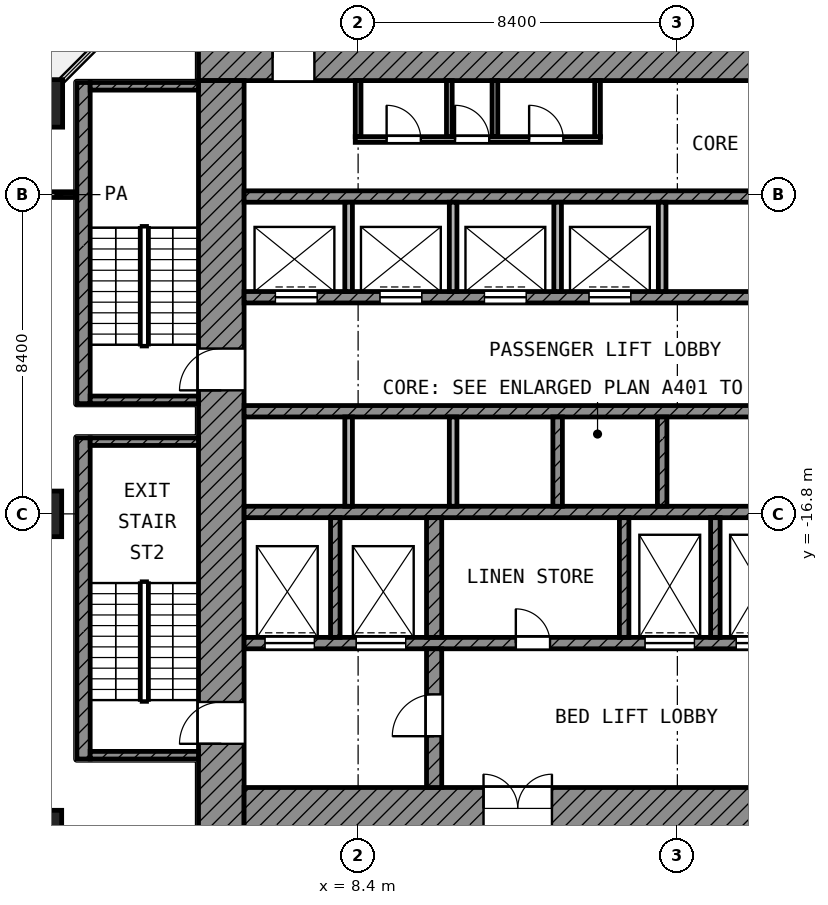
"""IFC4 building model, lengths in metres.
Left out: names, types, materials, properties, quantities, classifications, styles, units other than length and angle.
Written with IfcOpenShell. Run it as: python <this file> out.ifc"""

import sys

from ifc_helpers import new_model, si_unit, direction, frame, frame_2d, origin, origin_2d, place, context, subcontext, project, spatial, rectangle, extrude, element, fill, save


model = new_model("IFC4")
c1 = context("Model", 3, precision=1e-05, world=origin(), true_north=direction((0.0, 1.0)))
c2 = subcontext(c1, "Body", "Model", "MODEL_VIEW")
j1 = project(units=[si_unit("LENGTHUNIT", "METRE"), si_unit("PLANEANGLEUNIT", "RADIAN")], contexts=[c1])
p1 = place(None, origin())
s1 = spatial("IfcSite", under=j1, at=p1, CompositionType="ELEMENT")
p2 = place(p1, origin())
s2 = spatial("IfcBuilding", under=s1, at=p2, CompositionType="ELEMENT")
p3 = place(p2, frame((0.0, 0.0, 77.0)))
s3 = spatial("IfcBuildingStorey", under=s2, at=p3, CompositionType="ELEMENT", Elevation=77.0)
p4 = place(p3, frame((0.0, -6.0, 0.0), z_axis=(0.0, 0.0, 1.0), x_axis=(1.0, 0.0, 0.0)))
e1 = element("IfcColumn", 1, at=p4, inside=s3, PredefinedType="COLUMN", context=c2, shape_type="SweptSolid", body=[
    extrude(rectangle(XDim=1.25, YDim=1.25, at=origin_2d()), origin(), (0.0, 0.0, 1.0), 4.2),
])
for number, where, z_axis, x_axis in (
    (2, (0.0, -16.8, 0.0), (0.0, 0.0, 1.0), (1.0, 0.0, 0.0)),
    (3, (0.0, -25.2, 0.0), (0.0, 0.0, 1.0), (1.0, 0.0, 0.0)),
):
    element("IfcColumn", number, at=place(p3, frame(where, z_axis=z_axis, x_axis=x_axis)), inside=s3, PredefinedType="COLUMN", context=c2, shape_type="SweptSolid", body=[
        extrude(rectangle(XDim=1.2, YDim=1.2, at=origin_2d()), origin(), (0.0, 0.0, 1.0), 4.2),
    ])
p5 = place(p3, frame((4.2, -4.8, 0.0), z_axis=(0.0, 0.0, 1.0), x_axis=(1.0, 0.0, 0.0)))
e4 = element("IfcWall", 4, at=p5, inside=s3, PredefinedType="SHEAR", context=c2, shape_type="SweptSolid", body=[
    extrude(rectangle(XDim=20.9, YDim=1.2, at=frame_2d((10.45, 0.0))), origin(), (0.0, 0.0, 1.0), 3.9),
])
p6 = place(p5, frame((1.95, 0.0, 0.0)))
e5 = element("IfcOpeningElement", 5, at=p6, cuts=e4, PredefinedType="OPENING", context=c2, shape_type="SweptSolid", body=[
    extrude(rectangle(XDim=1.1, YDim=2.1, at=frame_2d((0.55, 1.05))), frame((0.0, 0.61, 0.0), z_axis=(0.0, -1.0, 0.0), x_axis=(1.0, 0.0, 0.0)), (0.0, 0.0, 1.0), 1.22),
])
p7 = place(p5, frame((17.95, 0.0, 0.0)))
e6 = element("IfcOpeningElement", 6, at=p7, cuts=e4, PredefinedType="OPENING", context=c2, shape_type="SweptSolid", body=[
    extrude(rectangle(XDim=1.1, YDim=2.1, at=frame_2d((0.55, 1.05))), frame((0.0, 0.61, 0.0), z_axis=(0.0, -1.0, 0.0), x_axis=(1.0, 0.0, 0.0)), (0.0, 0.0, 1.0), 1.22),
])
p8 = place(p3, frame((4.8, -25.1, 0.0), z_axis=(0.0, 0.0, 1.0), x_axis=(0.0, 1.0, 0.0)))
e7 = element("IfcWall", 7, at=p8, inside=s3, PredefinedType="SHEAR", context=c2, shape_type="SweptSolid", body=[
    extrude(rectangle(XDim=19.7, YDim=1.2, at=frame_2d((9.85, 0.0))), origin(), (0.0, 0.0, 1.0), 3.9),
])
p9 = place(p8, frame((11.55, 0.0, 0.0)))
e8 = element("IfcOpeningElement", 8, at=p9, cuts=e7, PredefinedType="OPENING", context=c2, shape_type="SweptSolid", body=[
    extrude(rectangle(XDim=1.1, YDim=2.1, at=frame_2d((0.55, 1.05))), frame((0.0, 0.61, 0.0), z_axis=(0.0, -1.0, 0.0), x_axis=(1.0, 0.0, 0.0)), (0.0, 0.0, 1.0), 1.22),
])
p10 = place(p8, frame((2.25, 0.0, 0.0)))
e9 = element("IfcOpeningElement", 9, at=p10, cuts=e7, PredefinedType="OPENING", context=c2, shape_type="SweptSolid", body=[
    extrude(rectangle(XDim=1.1, YDim=2.1, at=frame_2d((0.55, 1.05))), frame((0.0, 0.61, 0.0), z_axis=(0.0, -1.0, 0.0), x_axis=(1.0, 0.0, 0.0)), (0.0, 0.0, 1.0), 1.22),
])
p11 = place(p3, frame((5.4, -24.55, 0.0), z_axis=(0.0, 0.0, 1.0), x_axis=(1.0, 0.0, 0.0)))
e10 = element("IfcWall", 10, at=p11, inside=s3, PredefinedType="SHEAR", context=c2, shape_type="SweptSolid", body=[
    extrude(rectangle(XDim=18.6, YDim=1.1, at=frame_2d((9.3, 0.0))), origin(), (0.0, 0.0, 1.0), 3.9),
])
p12 = place(p11, frame((6.3, 0.0, 0.0)))
e11 = element("IfcOpeningElement", 11, at=p12, cuts=e10, PredefinedType="OPENING", context=c2, shape_type="SweptSolid", body=[
    extrude(rectangle(XDim=1.8, YDim=2.1, at=frame_2d((0.9, 1.05))), frame((0.0, 0.56, 0.0), z_axis=(0.0, -1.0, 0.0), x_axis=(1.0, 0.0, 0.0)), (0.0, 0.0, 1.0), 1.12),
])
p13 = place(p3, frame((5.4, -8.45, 0.0), z_axis=(0.0, 0.0, 1.0), x_axis=(1.0, 0.0, 0.0)))
e12 = element("IfcWall", 12, at=p13, inside=s3, PredefinedType="SHEAR", context=c2, shape_type="SweptSolid", body=[
    extrude(rectangle(XDim=16.65, YDim=0.3, at=frame_2d((8.325, 0.0))), origin(), (0.0, 0.0, 1.0), 3.9),
])
p14 = place(p3, frame((5.4, -11.1, 0.0), z_axis=(0.0, 0.0, 1.0), x_axis=(1.0, 0.0, 0.0)))
e13 = element("IfcWall", 13, at=p14, inside=s3, PredefinedType="SHEAR", context=c2, shape_type="SweptSolid", body=[
    extrude(rectangle(XDim=16.65, YDim=0.3, at=frame_2d((8.325, 0.0))), origin(), (0.0, 0.0, 1.0), 3.9),
])
p15 = place(p14, frame((0.825, 0.0, 0.0)))
e14 = element("IfcOpeningElement", 14, at=p15, cuts=e13, PredefinedType="OPENING", context=c2, shape_type="SweptSolid", body=[
    extrude(rectangle(XDim=1.1, YDim=2.1, at=frame_2d((0.55, 1.05))), frame((0.0, 0.16, 0.0), z_axis=(0.0, -1.0, 0.0), x_axis=(1.0, 0.0, 0.0)), (0.0, 0.0, 1.0), 0.32),
])
p16 = place(p14, frame((3.575, 0.0, 0.0)))
e15 = element("IfcOpeningElement", 15, at=p16, cuts=e13, PredefinedType="OPENING", context=c2, shape_type="SweptSolid", body=[
    extrude(rectangle(XDim=1.1, YDim=2.1, at=frame_2d((0.55, 1.05))), frame((0.0, 0.16, 0.0), z_axis=(0.0, -1.0, 0.0), x_axis=(1.0, 0.0, 0.0)), (0.0, 0.0, 1.0), 0.32),
])
p17 = place(p14, frame((6.325, 0.0, 0.0)))
e16 = element("IfcOpeningElement", 16, at=p17, cuts=e13, PredefinedType="OPENING", context=c2, shape_type="SweptSolid", body=[
    extrude(rectangle(XDim=1.1, YDim=2.1, at=frame_2d((0.55, 1.05))), frame((0.0, 0.16, 0.0), z_axis=(0.0, -1.0, 0.0), x_axis=(1.0, 0.0, 0.0)), (0.0, 0.0, 1.0), 0.32),
])
p18 = place(p14, frame((9.075, 0.0, 0.0)))
e17 = element("IfcOpeningElement", 17, at=p18, cuts=e13, PredefinedType="OPENING", context=c2, shape_type="SweptSolid", body=[
    extrude(rectangle(XDim=1.1, YDim=2.1, at=frame_2d((0.55, 1.05))), frame((0.0, 0.16, 0.0), z_axis=(0.0, -1.0, 0.0), x_axis=(1.0, 0.0, 0.0)), (0.0, 0.0, 1.0), 0.32),
])
for number, where, z_axis, x_axis in (
    (18, (5.4, -14.1, 0.0), (0.0, 0.0, 1.0), (1.0, 0.0, 0.0)),
    (19, (5.4, -16.75, 0.0), (0.0, 0.0, 1.0), (1.0, 0.0, 0.0)),
):
    element("IfcWall", number, at=place(p3, frame(where, z_axis=z_axis, x_axis=x_axis)), inside=s3, PredefinedType="SHEAR", context=c2, shape_type="SweptSolid", body=[
        extrude(rectangle(XDim=16.65, YDim=0.3, at=frame_2d((8.325, 0.0))), origin(), (0.0, 0.0, 1.0), 3.9),
    ])
p19 = place(p3, frame((5.4, -20.2, 0.0), z_axis=(0.0, 0.0, 1.0), x_axis=(1.0, 0.0, 0.0)))
e20 = element("IfcWall", 20, at=p19, inside=s3, PredefinedType="SHEAR", context=c2, shape_type="SweptSolid", body=[
    extrude(rectangle(XDim=14.65, YDim=0.3, at=frame_2d((7.325, 0.0))), origin(), (0.0, 0.0, 1.0), 3.9),
])
p20 = place(p19, frame((10.55, 0.0, 0.0)))
e21 = element("IfcOpeningElement", 21, at=p20, cuts=e20, PredefinedType="OPENING", context=c2, shape_type="SweptSolid", body=[
    extrude(rectangle(XDim=1.3, YDim=2.1, at=frame_2d((0.65, 1.05))), frame((0.0, 0.16, 0.0), z_axis=(0.0, -1.0, 0.0), x_axis=(1.0, 0.0, 0.0)), (0.0, 0.0, 1.0), 0.32),
])
p21 = place(p19, frame((12.95, 0.0, 0.0)))
e22 = element("IfcOpeningElement", 22, at=p21, cuts=e20, PredefinedType="OPENING", context=c2, shape_type="SweptSolid", body=[
    extrude(rectangle(XDim=1.3, YDim=2.1, at=frame_2d((0.65, 1.05))), frame((0.0, 0.16, 0.0), z_axis=(0.0, -1.0, 0.0), x_axis=(1.0, 0.0, 0.0)), (0.0, 0.0, 1.0), 0.32),
])
p22 = place(p19, frame((0.55, 0.0, 0.0)))
e23 = element("IfcOpeningElement", 23, at=p22, cuts=e20, PredefinedType="OPENING", context=c2, shape_type="SweptSolid", body=[
    extrude(rectangle(XDim=1.3, YDim=2.1, at=frame_2d((0.65, 1.05))), frame((0.0, 0.16, 0.0), z_axis=(0.0, -1.0, 0.0), x_axis=(1.0, 0.0, 0.0)), (0.0, 0.0, 1.0), 0.32),
])
p23 = place(p19, frame((2.95, 0.0, 0.0)))
e24 = element("IfcOpeningElement", 24, at=p23, cuts=e20, PredefinedType="OPENING", context=c2, shape_type="SweptSolid", body=[
    extrude(rectangle(XDim=1.3, YDim=2.1, at=frame_2d((0.65, 1.05))), frame((0.0, 0.16, 0.0), z_axis=(0.0, -1.0, 0.0), x_axis=(1.0, 0.0, 0.0)), (0.0, 0.0, 1.0), 0.32),
])
p24 = place(p19, frame((7.15, 0.0, 0.0)))
e25 = element("IfcOpeningElement", 25, at=p24, cuts=e20, PredefinedType="OPENING", context=c2, shape_type="SweptSolid", body=[
    extrude(rectangle(XDim=0.9, YDim=2.1, at=frame_2d((0.45, 1.05))), frame((0.0, 0.16, 0.0), z_axis=(0.0, -1.0, 0.0), x_axis=(1.0, 0.0, 0.0)), (0.0, 0.0, 1.0), 0.32),
])
p25 = place(p3, frame((10.4, -24.0, 0.0), z_axis=(0.0, 0.0, 1.0), x_axis=(0.0, 1.0, 0.0)))
e26 = element("IfcWall", 26, at=p25, inside=s3, PredefinedType="SHEAR", context=c2, shape_type="SweptSolid", body=[
    extrude(rectangle(XDim=3.65, YDim=0.4, at=frame_2d((1.825, 0.0))), origin(), (0.0, 0.0, 1.0), 3.9),
])
p26 = place(p25, frame((1.35, 0.0, 0.0)))
e27 = element("IfcOpeningElement", 27, at=p26, cuts=e26, PredefinedType="OPENING", context=c2, shape_type="SweptSolid", body=[
    extrude(rectangle(XDim=1.1, YDim=2.1, at=frame_2d((0.55, 1.05))), frame((0.0, 0.21, 0.0), z_axis=(0.0, -1.0, 0.0), x_axis=(1.0, 0.0, 0.0)), (0.0, 0.0, 1.0), 0.42),
])
p27 = place(p3, frame((10.4, -20.05, 0.0), z_axis=(0.0, 0.0, 1.0), x_axis=(0.0, 1.0, 0.0)))
e28 = element("IfcWall", 28, at=p27, inside=s3, PredefinedType="SHEAR", context=c2, shape_type="SweptSolid", body=[
    extrude(rectangle(XDim=3.15, YDim=0.4, at=frame_2d((1.575, 0.0))), origin(), (0.0, 0.0, 1.0), 3.9),
])
for number, where, z_axis, x_axis in (
    (29, (7.8, -20.05, 0.0), (0.0, 0.0, 1.0), (0.0, 1.0, 0.0)),
    (30, (15.4, -20.05, 0.0), (0.0, 0.0, 1.0), (0.0, 1.0, 0.0)),
    (31, (17.8, -20.05, 0.0), (0.0, 0.0, 1.0), (0.0, 1.0, 0.0)),
):
    element("IfcWall", number, at=place(p3, frame(where, z_axis=z_axis, x_axis=x_axis)), inside=s3, PredefinedType="SHEAR", context=c2, shape_type="SweptSolid", body=[
        extrude(rectangle(XDim=3.15, YDim=0.25, at=frame_2d((1.575, 0.0))), origin(), (0.0, 0.0, 1.0), 3.9),
    ])
for number, where, z_axis, x_axis in (
    (32, (8.15, -10.95, 0.0), (0.0, 0.0, 1.0), (0.0, 1.0, 0.0)),
    (33, (10.9, -10.95, 0.0), (0.0, 0.0, 1.0), (0.0, 1.0, 0.0)),
    (34, (13.65, -10.95, 0.0), (0.0, 0.0, 1.0), (0.0, 1.0, 0.0)),
    (35, (16.4, -10.95, 0.0), (0.0, 0.0, 1.0), (0.0, 1.0, 0.0)),
):
    element("IfcWall", number, at=place(p3, frame(where, z_axis=z_axis, x_axis=x_axis)), inside=s3, PredefinedType="PARTITIONING", context=c2, shape_type="SweptSolid", body=[
        extrude(rectangle(XDim=2.35, YDim=0.2, at=frame_2d((1.175, 0.0))), origin(), (0.0, 0.0, 1.0), 3.9),
    ])
for number, where, z_axis, x_axis in (
    (36, (8.15, -16.6, 0.0), (0.0, 0.0, 1.0), (0.0, 1.0, 0.0)),
    (37, (10.9, -16.6, 0.0), (0.0, 0.0, 1.0), (0.0, 1.0, 0.0)),
):
    element("IfcWall", number, at=place(p3, frame(where, z_axis=z_axis, x_axis=x_axis)), inside=s3, PredefinedType="PARTITIONING", context=c2, shape_type="SweptSolid", body=[
        extrude(rectangle(XDim=2.35, YDim=0.2, at=frame_2d((1.175, 0.0))), origin(), (0.0, 0.0, 1.0), 3.9),
    ])
for number, where, z_axis, x_axis in (
    (38, (13.65, -16.6, 0.0), (0.0, 0.0, 1.0), (0.0, 1.0, 0.0)),
    (39, (16.4, -16.6, 0.0), (0.0, 0.0, 1.0), (0.0, 1.0, 0.0)),
):
    element("IfcWall", number, at=place(p3, frame(where, z_axis=z_axis, x_axis=x_axis)), inside=s3, PredefinedType="SHEAR", context=c2, shape_type="SweptSolid", body=[
        extrude(rectangle(XDim=2.35, YDim=0.25, at=frame_2d((1.175, 0.0))), origin(), (0.0, 0.0, 1.0), 3.9),
    ])
p28 = place(p3, frame((8.325, -6.95, 0.0), z_axis=(0.0, 0.0, 1.0), x_axis=(1.0, 0.0, 0.0)))
e40 = element("IfcWall", 40, at=p28, inside=s3, PredefinedType="PARTITIONING", context=c2, shape_type="SweptSolid", body=[
    extrude(rectangle(XDim=6.45, YDim=0.15, at=frame_2d((3.225, 0.0))), origin(), (0.0, 0.0, 1.0), 3.9),
])
p29 = place(p28, frame((0.825, 0.0, 0.0)))
e41 = element("IfcOpeningElement", 41, at=p29, cuts=e40, PredefinedType="OPENING", context=c2, shape_type="SweptSolid", body=[
    extrude(rectangle(XDim=0.9, YDim=2.1, at=frame_2d((0.45, 1.05))), frame((0.0, 0.085, 0.0), z_axis=(0.0, -1.0, 0.0), x_axis=(1.0, 0.0, 0.0)), (0.0, 0.0, 1.0), 0.17),
])
p30 = place(p28, frame((2.625, 0.0, 0.0)))
e42 = element("IfcOpeningElement", 42, at=p30, cuts=e40, PredefinedType="OPENING", context=c2, shape_type="SweptSolid", body=[
    extrude(rectangle(XDim=0.9, YDim=2.1, at=frame_2d((0.45, 1.05))), frame((0.0, 0.085, 0.0), z_axis=(0.0, -1.0, 0.0), x_axis=(1.0, 0.0, 0.0)), (0.0, 0.0, 1.0), 0.17),
])
p31 = place(p28, frame((4.575, 0.0, 0.0)))
e43 = element("IfcOpeningElement", 43, at=p31, cuts=e40, PredefinedType="OPENING", context=c2, shape_type="SweptSolid", body=[
    extrude(rectangle(XDim=0.9, YDim=2.1, at=frame_2d((0.45, 1.05))), frame((0.0, 0.085, 0.0), z_axis=(0.0, -1.0, 0.0), x_axis=(1.0, 0.0, 0.0)), (0.0, 0.0, 1.0), 0.17),
])
for number, where, z_axis, x_axis in (
    (44, (8.4, -6.875, 0.0), (0.0, 0.0, 1.0), (0.0, 1.0, 0.0)),
    (45, (10.8, -6.875, 0.0), (0.0, 0.0, 1.0), (0.0, 1.0, 0.0)),
    (46, (12.0, -6.875, 0.0), (0.0, 0.0, 1.0), (0.0, 1.0, 0.0)),
    (47, (14.7, -6.875, 0.0), (0.0, 0.0, 1.0), (0.0, 1.0, 0.0)),
):
    element("IfcWall", number, at=place(p3, frame(where, z_axis=z_axis, x_axis=x_axis)), inside=s3, PredefinedType="PARTITIONING", context=c2, shape_type="SweptSolid", body=[
        extrude(rectangle(XDim=1.475, YDim=0.15, at=frame_2d((0.738, 0.0))), origin(), (0.0, 0.0, 1.0), 3.9),
    ])
p32 = place(p3, frame((1.175, -13.9, 0.0), z_axis=(0.0, 0.0, 1.0), x_axis=(0.0, 1.0, 0.0)))
e48 = element("IfcWall", 48, at=p32, inside=s3, PredefinedType="SHEAR", context=c2, shape_type="SweptSolid", body=[
    extrude(rectangle(XDim=8.45, YDim=0.35, at=frame_2d((4.225, 0.0))), origin(), (0.0, 0.0, 1.0), 3.9),
])
for number, where, z_axis, x_axis in (
    (49, (1.35, -5.55, 0.0), (0.0, 0.0, 1.0), (1.0, 0.0, 0.0)),
    (50, (1.35, -13.8, 0.0), (0.0, 0.0, 1.0), (1.0, 0.0, 0.0)),
):
    element("IfcWall", number, at=place(p3, frame(where, z_axis=z_axis, x_axis=x_axis)), inside=s3, PredefinedType="SHEAR", context=c2, shape_type="SweptSolid", body=[
        extrude(rectangle(XDim=2.85, YDim=0.2, at=frame_2d((1.425, 0.0))), origin(), (0.0, 0.0, 1.0), 3.9),
    ])
p33 = place(p3, frame((1.175, -23.25, 0.0), z_axis=(0.0, 0.0, 1.0), x_axis=(0.0, 1.0, 0.0)))
e51 = element("IfcWall", 51, at=p33, inside=s3, PredefinedType="SHEAR", context=c2, shape_type="SweptSolid", body=[
    extrude(rectangle(XDim=8.45, YDim=0.35, at=frame_2d((4.225, 0.0))), origin(), (0.0, 0.0, 1.0), 3.9),
])
for number, where, z_axis, x_axis in (
    (52, (1.35, -14.9, 0.0), (0.0, 0.0, 1.0), (1.0, 0.0, 0.0)),
    (53, (1.35, -23.15, 0.0), (0.0, 0.0, 1.0), (1.0, 0.0, 0.0)),
):
    element("IfcWall", number, at=place(p3, frame(where, z_axis=z_axis, x_axis=x_axis)), inside=s3, PredefinedType="SHEAR", context=c2, shape_type="SweptSolid", body=[
        extrude(rectangle(XDim=2.85, YDim=0.2, at=frame_2d((1.425, 0.0))), origin(), (0.0, 0.0, 1.0), 3.9),
    ])
p34 = place(p3, frame((0.08, -8.4, 0.0), z_axis=(0.0, 0.0, 1.0), x_axis=(1.0, 0.0, 0.0)))
e54 = element("IfcWall", 54, at=p34, inside=s3, PredefinedType="PARTITIONING", context=c2, shape_type="SweptSolid", body=[
    extrude(rectangle(XDim=0.89, YDim=0.15, at=frame_2d((0.445, 0.0))), origin(), (0.0, 0.0, 1.0), 3.9),
])
p35 = place(p15, origin())
e55 = element("IfcDoor", 55, at=p35, inside=s3, OperationType="DOUBLE_DOOR_SLIDING", PredefinedType="DOOR", context=c2, shape_type="SweptSolid", body=[
    extrude(rectangle(XDim=1.1, YDim=2.1, at=frame_2d((0.55, 1.05))), frame((0.0, 0.025, 0.0), z_axis=(0.0, -1.0, 0.0), x_axis=(1.0, 0.0, 0.0)), (0.0, 0.0, 1.0), 0.05),
])
fill(e14, e55)
p36 = place(p16, origin())
e56 = element("IfcDoor", 56, at=p36, inside=s3, OperationType="DOUBLE_DOOR_SLIDING", PredefinedType="DOOR", context=c2, shape_type="SweptSolid", body=[
    extrude(rectangle(XDim=1.1, YDim=2.1, at=frame_2d((0.55, 1.05))), frame((0.0, 0.025, 0.0), z_axis=(0.0, -1.0, 0.0), x_axis=(1.0, 0.0, 0.0)), (0.0, 0.0, 1.0), 0.05),
])
fill(e15, e56)
p37 = place(p17, origin())
e57 = element("IfcDoor", 57, at=p37, inside=s3, OperationType="DOUBLE_DOOR_SLIDING", PredefinedType="DOOR", context=c2, shape_type="SweptSolid", body=[
    extrude(rectangle(XDim=1.1, YDim=2.1, at=frame_2d((0.55, 1.05))), frame((0.0, 0.025, 0.0), z_axis=(0.0, -1.0, 0.0), x_axis=(1.0, 0.0, 0.0)), (0.0, 0.0, 1.0), 0.05),
])
fill(e16, e57)
p38 = place(p18, origin())
e58 = element("IfcDoor", 58, at=p38, inside=s3, OperationType="DOUBLE_DOOR_SLIDING", PredefinedType="DOOR", context=c2, shape_type="SweptSolid", body=[
    extrude(rectangle(XDim=1.1, YDim=2.1, at=frame_2d((0.55, 1.05))), frame((0.0, 0.025, 0.0), z_axis=(0.0, -1.0, 0.0), x_axis=(1.0, 0.0, 0.0)), (0.0, 0.0, 1.0), 0.05),
])
fill(e17, e58)
p39 = place(p20, origin())
e59 = element("IfcDoor", 59, at=p39, inside=s3, OperationType="DOUBLE_DOOR_SLIDING", PredefinedType="DOOR", context=c2, shape_type="SweptSolid", body=[
    extrude(rectangle(XDim=1.3, YDim=2.1, at=frame_2d((0.65, 1.05))), frame((0.0, 0.025, 0.0), z_axis=(0.0, -1.0, 0.0), x_axis=(1.0, 0.0, 0.0)), (0.0, 0.0, 1.0), 0.05),
])
fill(e21, e59)
p40 = place(p21, origin())
e60 = element("IfcDoor", 60, at=p40, inside=s3, OperationType="DOUBLE_DOOR_SLIDING", PredefinedType="DOOR", context=c2, shape_type="SweptSolid", body=[
    extrude(rectangle(XDim=1.3, YDim=2.1, at=frame_2d((0.65, 1.05))), frame((0.0, 0.025, 0.0), z_axis=(0.0, -1.0, 0.0), x_axis=(1.0, 0.0, 0.0)), (0.0, 0.0, 1.0), 0.05),
])
fill(e22, e60)
p41 = place(p22, origin())
e61 = element("IfcDoor", 61, at=p41, inside=s3, OperationType="DOUBLE_DOOR_SLIDING", PredefinedType="DOOR", context=c2, shape_type="SweptSolid", body=[
    extrude(rectangle(XDim=1.3, YDim=2.1, at=frame_2d((0.65, 1.05))), frame((0.0, 0.025, 0.0), z_axis=(0.0, -1.0, 0.0), x_axis=(1.0, 0.0, 0.0)), (0.0, 0.0, 1.0), 0.05),
])
fill(e23, e61)
p42 = place(p23, origin())
e62 = element("IfcDoor", 62, at=p42, inside=s3, OperationType="DOUBLE_DOOR_SLIDING", PredefinedType="DOOR", context=c2, shape_type="SweptSolid", body=[
    extrude(rectangle(XDim=1.3, YDim=2.1, at=frame_2d((0.65, 1.05))), frame((0.0, 0.025, 0.0), z_axis=(0.0, -1.0, 0.0), x_axis=(1.0, 0.0, 0.0)), (0.0, 0.0, 1.0), 0.05),
])
fill(e24, e62)
p43 = place(p9, origin())
e63 = element("IfcDoor", 63, at=p43, inside=s3, OperationType="SINGLE_SWING_LEFT", PredefinedType="DOOR", context=c2, shape_type="SweptSolid", body=[
    extrude(rectangle(XDim=1.1, YDim=2.1, at=frame_2d((0.55, 1.05))), frame((0.0, 0.025, 0.0), z_axis=(0.0, -1.0, 0.0), x_axis=(1.0, 0.0, 0.0)), (0.0, 0.0, 1.0), 0.05),
])
fill(e8, e63)
p44 = place(p10, origin())
e64 = element("IfcDoor", 64, at=p44, inside=s3, OperationType="SINGLE_SWING_LEFT", PredefinedType="DOOR", context=c2, shape_type="SweptSolid", body=[
    extrude(rectangle(XDim=1.1, YDim=2.1, at=frame_2d((0.55, 1.05))), frame((0.0, 0.025, 0.0), z_axis=(0.0, -1.0, 0.0), x_axis=(1.0, 0.0, 0.0)), (0.0, 0.0, 1.0), 0.05),
])
fill(e9, e64)
p45 = place(p6, origin())
e65 = element("IfcDoor", 65, at=p45, inside=s3, OperationType="SINGLE_SWING_LEFT", PredefinedType="DOOR", context=c2, shape_type="SweptSolid", body=[
    extrude(rectangle(XDim=1.1, YDim=2.1, at=frame_2d((0.55, 1.05))), frame((0.0, 0.025, 0.0), z_axis=(0.0, -1.0, 0.0), x_axis=(1.0, 0.0, 0.0)), (0.0, 0.0, 1.0), 0.05),
])
fill(e5, e65)
p46 = place(p26, origin())
e66 = element("IfcDoor", 66, at=p46, inside=s3, OperationType="SINGLE_SWING_LEFT", PredefinedType="DOOR", context=c2, shape_type="SweptSolid", body=[
    extrude(rectangle(XDim=1.1, YDim=2.1, at=frame_2d((0.55, 1.05))), frame((0.0, 0.025, 0.0), z_axis=(0.0, -1.0, 0.0), x_axis=(1.0, 0.0, 0.0)), (0.0, 0.0, 1.0), 0.05),
])
fill(e27, e66)
p47 = place(p12, origin())
e67 = element("IfcDoor", 67, at=p47, inside=s3, OperationType="DOUBLE_DOOR_SINGLE_SWING", PredefinedType="DOOR", context=c2, shape_type="SweptSolid", body=[
    extrude(rectangle(XDim=1.8, YDim=2.1, at=frame_2d((0.9, 1.05))), frame((0.0, 0.025, 0.0), z_axis=(0.0, -1.0, 0.0), x_axis=(1.0, 0.0, 0.0)), (0.0, 0.0, 1.0), 0.05),
])
fill(e11, e67)
p48 = place(p29, origin())
e68 = element("IfcDoor", 68, at=p48, inside=s3, OperationType="SINGLE_SWING_LEFT", PredefinedType="DOOR", context=c2, shape_type="SweptSolid", body=[
    extrude(rectangle(XDim=0.9, YDim=2.1, at=frame_2d((0.45, 1.05))), frame((0.0, 0.025, 0.0), z_axis=(0.0, -1.0, 0.0), x_axis=(1.0, 0.0, 0.0)), (0.0, 0.0, 1.0), 0.05),
])
fill(e41, e68)
p49 = place(p30, origin())
e69 = element("IfcDoor", 69, at=p49, inside=s3, OperationType="SINGLE_SWING_LEFT", PredefinedType="DOOR", context=c2, shape_type="SweptSolid", body=[
    extrude(rectangle(XDim=0.9, YDim=2.1, at=frame_2d((0.45, 1.05))), frame((0.0, 0.025, 0.0), z_axis=(0.0, -1.0, 0.0), x_axis=(1.0, 0.0, 0.0)), (0.0, 0.0, 1.0), 0.05),
])
fill(e42, e69)
p50 = place(p31, origin())
e70 = element("IfcDoor", 70, at=p50, inside=s3, OperationType="SINGLE_SWING_LEFT", PredefinedType="DOOR", context=c2, shape_type="SweptSolid", body=[
    extrude(rectangle(XDim=0.9, YDim=2.1, at=frame_2d((0.45, 1.05))), frame((0.0, 0.025, 0.0), z_axis=(0.0, -1.0, 0.0), x_axis=(1.0, 0.0, 0.0)), (0.0, 0.0, 1.0), 0.05),
])
fill(e43, e70)
p51 = place(p24, origin())
e71 = element("IfcDoor", 71, at=p51, inside=s3, OperationType="SINGLE_SWING_LEFT", PredefinedType="DOOR", context=c2, shape_type="SweptSolid", body=[
    extrude(rectangle(XDim=0.9, YDim=2.1, at=frame_2d((0.45, 1.05))), frame((0.0, 0.025, 0.0), z_axis=(0.0, -1.0, 0.0), x_axis=(1.0, 0.0, 0.0)), (0.0, 0.0, 1.0), 0.05),
])
fill(e25, e71)
save(model, sys.argv[1])
